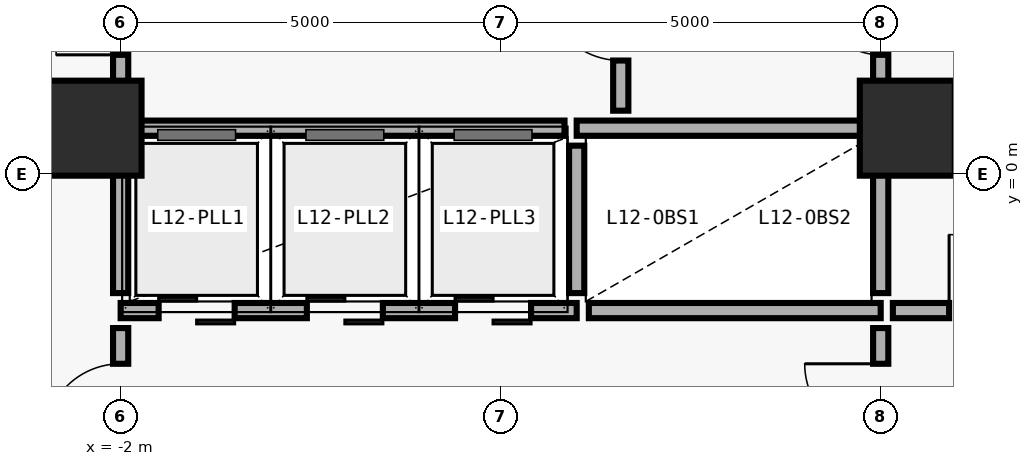
"""IFC4 building model, lengths in metres.
Left out: names, types, materials, properties, quantities, classifications, styles, units other than length and angle.
Written with IfcOpenShell. Run it as: python <this file> out.ifc"""

import sys

from ifc_helpers import new_model, si_unit, direction, frame, frame_2d, origin, origin_2d, place, context, subcontext, project, spatial, rectangle, extrude, element, fill, save


model = new_model("IFC4")
c1 = context("Model", 3, precision=1e-05, world=origin(), true_north=direction((0.0, 1.0)))
c2 = subcontext(c1, "Body", "Model", "MODEL_VIEW")
j1 = project(units=[si_unit("LENGTHUNIT", "METRE"), si_unit("PLANEANGLEUNIT", "RADIAN")], contexts=[c1])
p1 = place(None, origin())
s1 = spatial("IfcSite", under=j1, at=p1, CompositionType="ELEMENT")
p2 = place(p1, origin())
s2 = spatial("IfcBuilding", under=s1, at=p2, CompositionType="ELEMENT")
p3 = place(p2, frame((0.0, 0.0, 51.0)))
s3 = spatial("IfcBuildingStorey", under=s2, at=p3, CompositionType="ELEMENT", Elevation=51.0)
for number, where, z_axis, x_axis in (
    (1, (-2.35, 0.6, 0.0), (0.0, 0.0, 1.0), (1.0, 0.0, 0.0)),
    (2, (8.35, 0.6, 0.0), (0.0, 0.0, 1.0), (1.0, 0.0, 0.0)),
):
    element("IfcColumn", number, at=place(p3, frame(where, z_axis=z_axis, x_axis=x_axis)), inside=s3, PredefinedType="COLUMN", context=c2, shape_type="SweptSolid", body=[
        extrude(rectangle(XDim=1.25, YDim=1.25, at=origin_2d()), origin(), (0.0, 0.0, 1.0), 3.875),
    ])
p4 = place(p3, frame((4.0, 0.6, 0.0), z_axis=(0.0, 0.0, 1.0), x_axis=(1.0, 0.0, 0.0)))
e3 = element("IfcWall", 3, at=p4, inside=s3, PredefinedType="SOLIDWALL", context=c2, shape_type="SweptSolid", body=[
    extrude(rectangle(XDim=3.88, YDim=0.2, at=frame_2d((1.94, 0.0))), origin(), (0.0, 0.0, 1.0), 3.122),
])
p5 = place(p3, frame((-2.0, -1.8, 0.0), z_axis=(0.0, 0.0, 1.0), x_axis=(1.0, 0.0, 0.0)))
e4 = element("IfcWall", 4, at=p5, inside=s3, PredefinedType="SOLIDWALL", context=c2, shape_type="SweptSolid", body=[
    extrude(rectangle(XDim=6.0, YDim=0.2, at=frame_2d((3.0, 0.0))), origin(), (0.0, 0.0, 1.0), 3.64),
])
p6 = place(p5, frame((0.5, 0.0, 0.0)))
e5 = element("IfcOpeningElement", 5, at=p6, cuts=e4, PredefinedType="OPENING", context=c2, shape_type="SweptSolid", body=[
    extrude(rectangle(XDim=1.0, YDim=2.2, at=frame_2d((0.5, 1.1))), frame((0.0, 0.11, 0.0), z_axis=(0.0, -1.0, 0.0), x_axis=(1.0, 0.0, 0.0)), (0.0, 0.0, 1.0), 0.22),
])
p7 = place(p5, frame((2.45, 0.0, 0.0)))
e6 = element("IfcOpeningElement", 6, at=p7, cuts=e4, PredefinedType="OPENING", context=c2, shape_type="SweptSolid", body=[
    extrude(rectangle(XDim=1.0, YDim=2.2, at=frame_2d((0.5, 1.1))), frame((0.0, 0.11, 0.0), z_axis=(0.0, -1.0, 0.0), x_axis=(1.0, 0.0, 0.0)), (0.0, 0.0, 1.0), 0.22),
])
p8 = place(p5, frame((4.4, 0.0, 0.0)))
e7 = element("IfcOpeningElement", 7, at=p8, cuts=e4, PredefinedType="OPENING", context=c2, shape_type="SweptSolid", body=[
    extrude(rectangle(XDim=1.0, YDim=2.2, at=frame_2d((0.5, 1.1))), frame((0.0, 0.11, 0.0), z_axis=(0.0, -1.0, 0.0), x_axis=(1.0, 0.0, 0.0)), (0.0, 0.0, 1.0), 0.22),
])
p9 = place(p3, frame((-2.0, -1.57, 0.0), z_axis=(0.0, 0.0, 1.0), x_axis=(0.0, 1.0, 0.0)))
e8 = element("IfcWall", 8, at=p9, inside=s3, PredefinedType="SOLIDWALL", context=c2, shape_type="SweptSolid", body=[
    extrude(rectangle(XDim=2.05, YDim=0.2, at=frame_2d((1.025, 0.0))), origin(), (0.0, 0.0, 1.0), 3.022),
])
p10 = place(p3, frame((4.16, -1.8, 0.0), z_axis=(0.0, 0.0, 1.0), x_axis=(1.0, 0.0, 0.0)))
e9 = element("IfcWall", 9, at=p10, inside=s3, PredefinedType="SOLIDWALL", context=c2, shape_type="SweptSolid", body=[
    extrude(rectangle(XDim=3.84, YDim=0.2, at=frame_2d((1.92, 0.0))), origin(), (0.0, 0.0, 1.0), 3.64),
])
p11 = place(p3, frame((4.0, -1.57, 0.0), z_axis=(0.0, 0.0, 1.0), x_axis=(0.0, 1.0, 0.0)))
e10 = element("IfcWall", 10, at=p11, inside=s3, PredefinedType="SOLIDWALL", context=c2, shape_type="SweptSolid", body=[
    extrude(rectangle(XDim=1.94, YDim=0.2, at=frame_2d((0.97, 0.0))), origin(), (0.0, 0.0, 1.0), 3.64),
])
p12 = place(p3, frame((8.0, -1.57, 0.0), z_axis=(0.0, 0.0, 1.0), x_axis=(0.0, 1.0, 0.0)))
e11 = element("IfcWall", 11, at=p12, inside=s3, PredefinedType="SOLIDWALL", context=c2, shape_type="SweptSolid", body=[
    extrude(rectangle(XDim=2.05, YDim=0.2, at=frame_2d((1.025, 0.0))), origin(), (0.0, 0.0, 1.0), 3.072),
])
p13 = place(p3, frame((4.58, 0.83, 0.0), z_axis=(0.0, 0.0, 1.0), x_axis=(0.0, 1.0, 0.0)))
e12 = element("IfcWall", 12, at=p13, inside=s3, PredefinedType="MOVABLE", context=c2, shape_type="SweptSolid", body=[
    extrude(rectangle(XDim=2.14, YDim=0.2, at=frame_2d((1.07, 0.0))), origin(), (0.0, 0.0, 1.0), 3.64),
])
p14 = place(p13, frame((0.66, 0.0, 0.0)))
e13 = element("IfcOpeningElement", 13, at=p14, cuts=e12, PredefinedType="OPENING", context=c2, shape_type="SweptSolid", body=[
    extrude(rectangle(XDim=1.0, YDim=2.1, at=frame_2d((0.5, 1.05))), frame((0.0, 0.11, 0.0), z_axis=(0.0, -1.0, 0.0), x_axis=(1.0, 0.0, 0.0)), (0.0, 0.0, 1.0), 0.22),
])
p15 = place(p3, frame((-2.0, 0.72, 0.0), z_axis=(0.0, 0.0, 1.0), x_axis=(0.0, 1.0, 0.0)))
e14 = element("IfcWall", 14, at=p15, inside=s3, PredefinedType="MOVABLE", context=c2, shape_type="SweptSolid", body=[
    extrude(rectangle(XDim=2.25, YDim=0.2, at=frame_2d((1.125, 0.0))), origin(), (0.0, 0.0, 1.0), 2.872),
])
p16 = place(p15, frame((0.845, 0.0, 0.0)))
e15 = element("IfcOpeningElement", 15, at=p16, cuts=e14, PredefinedType="OPENING", context=c2, shape_type="SweptSolid", body=[
    extrude(rectangle(XDim=0.85, YDim=2.1, at=frame_2d((0.425, 1.05))), frame((0.0, 0.11, 0.0), z_axis=(0.0, -1.0, 0.0), x_axis=(1.0, 0.0, 0.0)), (0.0, 0.0, 1.0), 0.22),
])
p17 = place(p3, frame((8.0, 0.72, 0.0), z_axis=(0.0, 0.0, 1.0), x_axis=(0.0, 1.0, 0.0)))
e16 = element("IfcWall", 16, at=p17, inside=s3, PredefinedType="MOVABLE", context=c2, shape_type="SweptSolid", body=[
    extrude(rectangle(XDim=2.25, YDim=0.2, at=frame_2d((1.125, 0.0))), origin(), (0.0, 0.0, 1.0), 2.872),
])
p18 = place(p17, frame((0.845, 0.0, 0.0)))
e17 = element("IfcOpeningElement", 17, at=p18, cuts=e16, PredefinedType="OPENING", context=c2, shape_type="SweptSolid", body=[
    extrude(rectangle(XDim=0.85, YDim=2.1, at=frame_2d((0.425, 1.05))), frame((0.0, 0.11, 0.0), z_axis=(0.0, -1.0, 0.0), x_axis=(1.0, 0.0, 0.0)), (0.0, 0.0, 1.0), 0.22),
])
p19 = place(p3, frame((-2.0, -3.97, 0.0), z_axis=(0.0, 0.0, 1.0), x_axis=(0.0, 1.0, 0.0)))
e18 = element("IfcWall", 18, at=p19, inside=s3, PredefinedType="MOVABLE", context=c2, shape_type="SweptSolid", body=[
    extrude(rectangle(XDim=1.94, YDim=0.2, at=frame_2d((0.97, 0.0))), origin(), (0.0, 0.0, 1.0), 3.022),
])
p20 = place(p19, frame((0.47, 0.0, 0.0)))
e19 = element("IfcOpeningElement", 19, at=p20, cuts=e18, PredefinedType="OPENING", context=c2, shape_type="SweptSolid", body=[
    extrude(rectangle(XDim=1.0, YDim=2.1, at=frame_2d((0.5, 1.05))), frame((0.0, 0.11, 0.0), z_axis=(0.0, -1.0, 0.0), x_axis=(1.0, 0.0, 0.0)), (0.0, 0.0, 1.0), 0.22),
])
p21 = place(p3, frame((8.0, -3.97, 0.0), z_axis=(0.0, 0.0, 1.0), x_axis=(0.0, 1.0, 0.0)))
e20 = element("IfcWall", 20, at=p21, inside=s3, PredefinedType="MOVABLE", context=c2, shape_type="SweptSolid", body=[
    extrude(rectangle(XDim=1.94, YDim=0.2, at=frame_2d((0.97, 0.0))), origin(), (0.0, 0.0, 1.0), 3.072),
])
p22 = place(p21, frame((0.47, 0.0, 0.0)))
e21 = element("IfcOpeningElement", 21, at=p22, cuts=e20, PredefinedType="OPENING", context=c2, shape_type="SweptSolid", body=[
    extrude(rectangle(XDim=1.0, YDim=2.1, at=frame_2d((0.5, 1.05))), frame((0.0, 0.11, 0.0), z_axis=(0.0, -1.0, 0.0), x_axis=(1.0, 0.0, 0.0)), (0.0, 0.0, 1.0), 0.22),
])
p23 = place(p3, frame((8.16, -1.8, 0.0), z_axis=(0.0, 0.0, 1.0), x_axis=(1.0, 0.0, 0.0)))
e22 = element("IfcWall", 22, at=p23, inside=s3, PredefinedType="MOVABLE", context=c2, shape_type="SweptSolid", body=[
    extrude(rectangle(XDim=2.64, YDim=0.2, at=frame_2d((1.32, 0.0))), origin(), (0.0, 0.0, 1.0), 3.64),
])
p24 = place(p23, frame((0.74, 0.0, 0.0)))
e23 = element("IfcOpeningElement", 23, at=p24, cuts=e22, PredefinedType="OPENING", context=c2, shape_type="SweptSolid", body=[
    extrude(rectangle(XDim=1.0, YDim=2.1, at=frame_2d((0.5, 1.05))), frame((0.0, 0.11, 0.0), z_axis=(0.0, -1.0, 0.0), x_axis=(1.0, 0.0, 0.0)), (0.0, 0.0, 1.0), 0.22),
])
p25 = place(p3, frame((-1.88, 0.6, 0.0), z_axis=(0.0, 0.0, 1.0), x_axis=(1.0, 0.0, 0.0)))
e24 = element("IfcWall", 24, at=p25, inside=s3, PredefinedType="MOVABLE", context=c2, shape_type="SweptSolid", body=[
    extrude(rectangle(XDim=5.72, YDim=0.2, at=frame_2d((2.86, 0.0))), origin(), (0.0, 0.0, 1.0), 3.122),
])
p26 = place(p14, origin())
e25 = element("IfcDoor", 25, at=p26, inside=s3, OperationType="SINGLE_SWING_RIGHT", PredefinedType="DOOR", context=c2, shape_type="SweptSolid", body=[
    extrude(rectangle(XDim=1.0, YDim=2.1, at=frame_2d((0.5, 1.05))), frame((0.0, 0.025, 0.0), z_axis=(0.0, -1.0, 0.0), x_axis=(1.0, 0.0, 0.0)), (0.0, 0.0, 1.0), 0.05),
])
fill(e13, e25)
p27 = place(p16, origin())
e26 = element("IfcDoor", 26, at=p27, inside=s3, OperationType="SINGLE_SWING_LEFT", PredefinedType="DOOR", context=c2, shape_type="SweptSolid", body=[
    extrude(rectangle(XDim=0.85, YDim=2.1, at=frame_2d((0.425, 1.05))), frame((0.0, 0.025, 0.0), z_axis=(0.0, -1.0, 0.0), x_axis=(1.0, 0.0, 0.0)), (0.0, 0.0, 1.0), 0.05),
])
fill(e15, e26)
p28 = place(p18, origin())
e27 = element("IfcDoor", 27, at=p28, inside=s3, OperationType="SINGLE_SWING_RIGHT", PredefinedType="DOOR", context=c2, shape_type="SweptSolid", body=[
    extrude(rectangle(XDim=0.85, YDim=2.1, at=frame_2d((0.425, 1.05))), frame((0.0, 0.025, 0.0), z_axis=(0.0, -1.0, 0.0), x_axis=(1.0, 0.0, 0.0)), (0.0, 0.0, 1.0), 0.05),
])
fill(e17, e27)
p29 = place(p20, origin())
e28 = element("IfcDoor", 28, at=p29, inside=s3, OperationType="SINGLE_SWING_LEFT", PredefinedType="DOOR", context=c2, shape_type="SweptSolid", body=[
    extrude(rectangle(XDim=1.0, YDim=2.1, at=frame_2d((0.5, 1.05))), frame((0.0, 0.025, 0.0), z_axis=(0.0, -1.0, 0.0), x_axis=(1.0, 0.0, 0.0)), (0.0, 0.0, 1.0), 0.05),
])
fill(e19, e28)
p30 = place(p22, origin())
e29 = element("IfcDoor", 29, at=p30, inside=s3, OperationType="SINGLE_SWING_RIGHT", PredefinedType="DOOR", context=c2, shape_type="SweptSolid", body=[
    extrude(rectangle(XDim=1.0, YDim=2.1, at=frame_2d((0.5, 1.05))), frame((0.0, 0.025, 0.0), z_axis=(0.0, -1.0, 0.0), x_axis=(1.0, 0.0, 0.0)), (0.0, 0.0, 1.0), 0.05),
])
fill(e21, e29)
p31 = place(p24, origin())
e30 = element("IfcDoor", 30, at=p31, inside=s3, OperationType="SINGLE_SWING_LEFT", PredefinedType="DOOR", context=c2, shape_type="SweptSolid", body=[
    extrude(rectangle(XDim=1.0, YDim=2.1, at=frame_2d((0.5, 1.05))), frame((0.0, 0.025, 0.0), z_axis=(0.0, -1.0, 0.0), x_axis=(1.0, 0.0, 0.0)), (0.0, 0.0, 1.0), 0.05),
])
fill(e23, e30)
p32 = place(p6, origin())
e31 = element("IfcDoor", 31, at=p32, inside=s3, OperationType="DOUBLE_DOOR_SLIDING", PredefinedType="DOOR", context=c2, shape_type="SweptSolid", body=[
    extrude(rectangle(XDim=1.0, YDim=2.2, at=frame_2d((0.5, 1.1))), frame((0.0, 0.025, 0.0), z_axis=(0.0, -1.0, 0.0), x_axis=(1.0, 0.0, 0.0)), (0.0, 0.0, 1.0), 0.05),
])
fill(e5, e31)
p33 = place(p7, origin())
e32 = element("IfcDoor", 32, at=p33, inside=s3, OperationType="DOUBLE_DOOR_SLIDING", PredefinedType="DOOR", context=c2, shape_type="SweptSolid", body=[
    extrude(rectangle(XDim=1.0, YDim=2.2, at=frame_2d((0.5, 1.1))), frame((0.0, 0.025, 0.0), z_axis=(0.0, -1.0, 0.0), x_axis=(1.0, 0.0, 0.0)), (0.0, 0.0, 1.0), 0.05),
])
fill(e6, e32)
p34 = place(p8, origin())
e33 = element("IfcDoor", 33, at=p34, inside=s3, OperationType="DOUBLE_DOOR_SLIDING", PredefinedType="DOOR", context=c2, shape_type="SweptSolid", body=[
    extrude(rectangle(XDim=1.0, YDim=2.2, at=frame_2d((0.5, 1.1))), frame((0.0, 0.025, 0.0), z_axis=(0.0, -1.0, 0.0), x_axis=(1.0, 0.0, 0.0)), (0.0, 0.0, 1.0), 0.05),
])
fill(e7, e33)
save(model, sys.argv[1])
